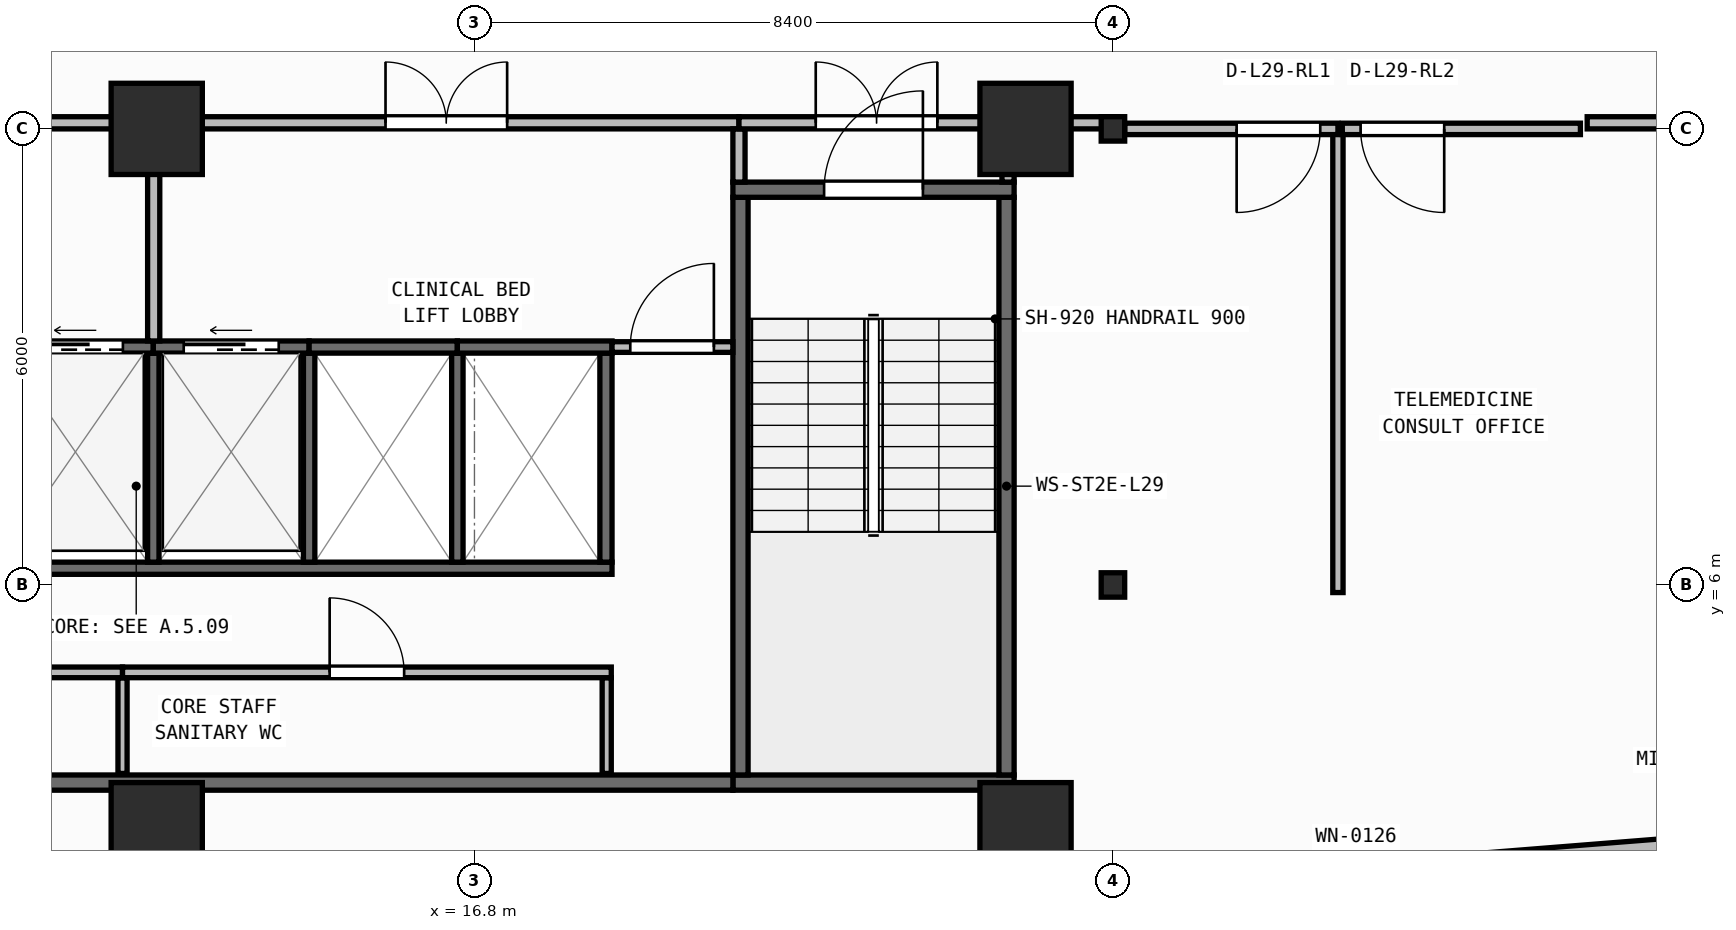
"""IFC4 building model, lengths in metres.
Left out: names, types, materials, properties, quantities, classifications, styles, units other than length and angle.
Written with IfcOpenShell. Run it as: python <this file> out.ifc"""

import sys

from ifc_helpers import new_model, si_unit, direction, frame, frame_2d, origin, origin_2d, place, context, subcontext, project, spatial, rectangle, i_section, extrude, element, fill, save


model = new_model("IFC4")
c1 = context("Model", 3, precision=1e-05, world=origin(), true_north=direction((0.0, 1.0)))
c2 = subcontext(c1, "Body", "Model", "MODEL_VIEW")
j1 = project(units=[si_unit("LENGTHUNIT", "METRE"), si_unit("PLANEANGLEUNIT", "RADIAN")], contexts=[c1])
p1 = place(None, origin())
s1 = spatial("IfcSite", under=j1, at=p1, CompositionType="ELEMENT")
p2 = place(p1, origin())
s2 = spatial("IfcBuilding", under=s1, at=p2, CompositionType="ELEMENT")
p3 = place(p2, frame((0.0, 0.0, 119.15)))
s3 = spatial("IfcBuildingStorey", under=s2, at=p3, CompositionType="ELEMENT", Elevation=119.15)
for number, where, z_axis, x_axis in (
    (1, (12.62, 2.8, 0.0), (0.0, 0.0, 1.0), (1.0, 0.0, 0.0)),
    (2, (24.05, 2.8, 0.0), (0.0, 0.0, 1.0), (1.0, 0.0, 0.0)),
):
    element("IfcColumn", number, at=place(p3, frame(where, z_axis=z_axis, x_axis=x_axis)), inside=s3, PredefinedType="COLUMN", context=c2, shape_type="SweptSolid", body=[
        extrude(rectangle(XDim=1.2, YDim=1.2, at=origin_2d()), origin(), (0.0, 0.0, 1.0), 3.95),
    ])
p4 = place(p3, frame((25.2, 6.0, 0.0), z_axis=(0.0, 0.0, 1.0), x_axis=(1.0, 0.0, 0.0)))
e3 = element("IfcColumn", 3, at=p4, inside=s3, PredefinedType="COLUMN", context=c2, shape_type="SweptSolid", body=[
    extrude(i_section(OverallWidth=0.309, OverallDepth=0.321, WebThickness=0.014, FlangeThickness=0.022, FilletRadius=0.017, at=origin_2d()), origin(), (0.0, 0.0, 1.0), 3.95),
])
for number, where, z_axis, x_axis in (
    (4, (12.62, 12.0, 0.0), (0.0, 0.0, 1.0), (1.0, 0.0, 0.0)),
    (5, (24.05, 12.0, 0.0), (0.0, 0.0, 1.0), (1.0, 0.0, 0.0)),
):
    element("IfcColumn", number, at=place(p3, frame(where, z_axis=z_axis, x_axis=x_axis)), inside=s3, PredefinedType="COLUMN", context=c2, shape_type="SweptSolid", body=[
        extrude(rectangle(XDim=1.2, YDim=1.2, at=origin_2d()), origin(), (0.0, 0.0, 1.0), 3.95),
    ])
p5 = place(p3, frame((25.2, 12.0, 0.0), z_axis=(0.0, 0.0, 1.0), x_axis=(1.0, 0.0, 0.0)))
e6 = element("IfcColumn", 6, at=p5, inside=s3, PredefinedType="COLUMN", context=c2, shape_type="SweptSolid", body=[
    extrude(i_section(OverallWidth=0.309, OverallDepth=0.321, WebThickness=0.014, FlangeThickness=0.022, FilletRadius=0.017, at=origin_2d()), origin(), (0.0, 0.0, 1.0), 3.95),
])
p6 = place(p3, frame((2.76, 0.173, 0.0), z_axis=(0.0, 0.0, 1.0), x_axis=(0.996857931723, 0.079210251617, 0.0)))
e7 = element("IfcWall", 7, at=p6, inside=s3, PredefinedType="STANDARD", context=c2, shape_type="SweptSolid", body=[
    extrude(rectangle(XDim=51.442, YDim=0.26, at=frame_2d((25.721, 0.0))), origin(), (0.0, 0.0, 1.0), 3.71),
])
p7 = place(p6, frame((24.521, 0.0, 0.9)))
e8 = element("IfcOpeningElement", 8, at=p7, cuts=e7, PredefinedType="OPENING", context=c2, shape_type="SweptSolid", body=[
    extrude(rectangle(XDim=2.4, YDim=1.65, at=frame_2d((1.2, 0.825))), frame((0.0, 0.14, 0.0), z_axis=(0.0, -1.0, 0.0), x_axis=(1.0, 0.0, 0.0)), (0.0, 0.0, 1.0), 0.28),
])
p8 = place(p3, frame((20.2, 3.4, 0.0), z_axis=(0.0, 0.0, 1.0), x_axis=(1.0, 0.0, 0.0)))
e9 = element("IfcWall", 9, at=p8, inside=s3, PredefinedType="SHEAR", context=c2, shape_type="SweptSolid", body=[
    extrude(rectangle(XDim=3.7, YDim=0.2, at=frame_2d((1.85, 0.0))), origin(), (0.0, 0.0, 1.0), 3.71),
])
for number, where, z_axis, x_axis in (
    (10, (20.3, 3.5, 0.0), (0.0, 0.0, 1.0), (0.0, 1.0, 0.0)),
    (11, (23.8, 3.5, 0.0), (0.0, 0.0, 1.0), (0.0, 1.0, 0.0)),
):
    element("IfcWall", number, at=place(p3, frame(where, z_axis=z_axis, x_axis=x_axis)), inside=s3, PredefinedType="SHEAR", context=c2, shape_type="SweptSolid", body=[
        extrude(rectangle(XDim=7.6, YDim=0.2, at=frame_2d((3.8, 0.0))), origin(), (0.0, 0.0, 1.0), 3.71),
    ])
p9 = place(p3, frame((20.2, 11.2, 0.0), z_axis=(0.0, 0.0, 1.0), x_axis=(1.0, 0.0, 0.0)))
e12 = element("IfcWall", 12, at=p9, inside=s3, PredefinedType="SHEAR", context=c2, shape_type="SweptSolid", body=[
    extrude(rectangle(XDim=3.7, YDim=0.2, at=frame_2d((1.85, 0.0))), origin(), (0.0, 0.0, 1.0), 3.71),
])
p10 = place(p9, frame((1.2, 0.0, 0.0)))
e13 = element("IfcOpeningElement", 13, at=p10, cuts=e12, PredefinedType="OPENING", context=c2, shape_type="SweptSolid", body=[
    extrude(rectangle(XDim=1.3, YDim=2.15, at=frame_2d((0.65, 1.075))), frame((0.0, 0.11, 0.0), z_axis=(0.0, -1.0, 0.0), x_axis=(1.0, 0.0, 0.0)), (0.0, 0.0, 1.0), 0.22),
])
p11 = place(p3, frame((6.5, 3.4, 0.0), z_axis=(0.0, 0.0, 1.0), x_axis=(1.0, 0.0, 0.0)))
e14 = element("IfcWall", 14, at=p11, inside=s3, PredefinedType="SHEAR", context=c2, shape_type="SweptSolid", body=[
    extrude(rectangle(XDim=13.7, YDim=0.2, at=frame_2d((6.85, 0.0))), origin(), (0.0, 0.0, 1.0), 3.71),
])
p12 = place(p3, frame((6.5, 6.22, 0.0), z_axis=(0.0, 0.0, 1.0), x_axis=(1.0, 0.0, 0.0)))
e15 = element("IfcWall", 15, at=p12, inside=s3, PredefinedType="SHEAR", context=c2, shape_type="SweptSolid", body=[
    extrude(rectangle(XDim=12.11, YDim=0.16, at=frame_2d((6.055, 0.0))), origin(), (0.0, 0.0, 1.0), 3.71),
])
p13 = place(p3, frame((18.53, 6.3, 0.0), z_axis=(0.0, 0.0, 1.0), x_axis=(0.0, 1.0, 0.0)))
e16 = element("IfcWall", 16, at=p13, inside=s3, PredefinedType="SHEAR", context=c2, shape_type="SweptSolid", body=[
    extrude(rectangle(XDim=2.75, YDim=0.16, at=frame_2d((1.375, 0.0))), origin(), (0.0, 0.0, 1.0), 3.71),
])
for number, where, z_axis, x_axis in (
    (17, (12.575, 6.3, 0.0), (0.0, 0.0, 1.0), (0.0, 1.0, 0.0)),
    (18, (14.625, 6.3, 0.0), (0.0, 0.0, 1.0), (0.0, 1.0, 0.0)),
    (19, (16.575, 6.3, 0.0), (0.0, 0.0, 1.0), (0.0, 1.0, 0.0)),
):
    element("IfcWall", number, at=place(p3, frame(where, z_axis=z_axis, x_axis=x_axis)), inside=s3, PredefinedType="SHEAR", context=c2, shape_type="SweptSolid", body=[
        extrude(rectangle(XDim=2.75, YDim=0.15, at=frame_2d((1.375, 0.0))), origin(), (0.0, 0.0, 1.0), 3.71),
    ])
p14 = place(p3, frame((10.525, 9.13, 0.0), z_axis=(0.0, 0.0, 1.0), x_axis=(1.0, 0.0, 0.0)))
e20 = element("IfcWall", 20, at=p14, inside=s3, PredefinedType="SHEAR", context=c2, shape_type="SweptSolid", body=[
    extrude(rectangle(XDim=2.05, YDim=0.16, at=frame_2d((1.025, 0.0))), origin(), (0.0, 0.0, 1.0), 3.71),
])
p15 = place(p14, frame((0.4, 0.0, 0.0)))
e21 = element("IfcOpeningElement", 21, at=p15, cuts=e20, PredefinedType="OPENING", context=c2, shape_type="SweptSolid", body=[
    extrude(rectangle(XDim=1.25, YDim=2.15, at=frame_2d((0.625, 1.075))), frame((0.0, 0.09, 0.0), z_axis=(0.0, -1.0, 0.0), x_axis=(1.0, 0.0, 0.0)), (0.0, 0.0, 1.0), 0.18),
])
p16 = place(p3, frame((12.575, 9.13, 0.0), z_axis=(0.0, 0.0, 1.0), x_axis=(1.0, 0.0, 0.0)))
e22 = element("IfcWall", 22, at=p16, inside=s3, PredefinedType="SHEAR", context=c2, shape_type="SweptSolid", body=[
    extrude(rectangle(XDim=2.05, YDim=0.16, at=frame_2d((1.025, 0.0))), origin(), (0.0, 0.0, 1.0), 3.71),
])
p17 = place(p16, frame((0.4, 0.0, 0.0)))
e23 = element("IfcOpeningElement", 23, at=p17, cuts=e22, PredefinedType="OPENING", context=c2, shape_type="SweptSolid", body=[
    extrude(rectangle(XDim=1.25, YDim=2.15, at=frame_2d((0.625, 1.075))), frame((0.0, 0.09, 0.0), z_axis=(0.0, -1.0, 0.0), x_axis=(1.0, 0.0, 0.0)), (0.0, 0.0, 1.0), 0.18),
])
p18 = place(p3, frame((14.625, 9.13, 0.0), z_axis=(0.0, 0.0, 1.0), x_axis=(1.0, 0.0, 0.0)))
e24 = element("IfcWall", 24, at=p18, inside=s3, PredefinedType="SHEAR", context=c2, shape_type="SweptSolid", body=[
    extrude(rectangle(XDim=1.95, YDim=0.16, at=frame_2d((0.975, 0.0))), origin(), (0.0, 0.0, 1.0), 3.71),
])
p19 = place(p3, frame((16.575, 9.13, 0.0), z_axis=(0.0, 0.0, 1.0), x_axis=(1.0, 0.0, 0.0)))
e25 = element("IfcWall", 25, at=p19, inside=s3, PredefinedType="SHEAR", context=c2, shape_type="SweptSolid", body=[
    extrude(rectangle(XDim=2.035, YDim=0.16, at=frame_2d((1.018, 0.0))), origin(), (0.0, 0.0, 1.0), 3.71),
])
for number, where, z_axis, x_axis in (
    (26, (12.17, 3.52, 0.0), (0.0, 0.0, 1.0), (0.0, 1.0, 0.0)),
    (27, (18.54, 3.52, 0.0), (0.0, 0.0, 1.0), (0.0, 1.0, 0.0)),
):
    element("IfcWall", number, at=place(p3, frame(where, z_axis=z_axis, x_axis=x_axis)), inside=s3, PredefinedType="PARTITIONING", context=c2, shape_type="SweptSolid", body=[
        extrude(rectangle(XDim=1.26, YDim=0.12, at=frame_2d((0.63, 0.0))), origin(), (0.0, 0.0, 1.0), 3.71),
    ])
p20 = place(p3, frame((6.5, 4.85, 0.0), z_axis=(0.0, 0.0, 1.0), x_axis=(1.0, 0.0, 0.0)))
e28 = element("IfcWall", 28, at=p20, inside=s3, PredefinedType="PARTITIONING", context=c2, shape_type="SweptSolid", body=[
    extrude(rectangle(XDim=5.67, YDim=0.14, at=frame_2d((2.835, 0.0))), origin(), (0.0, 0.0, 1.0), 3.71),
])
p21 = place(p20, frame((2.285, 0.0, 0.0)))
e29 = element("IfcOpeningElement", 29, at=p21, cuts=e28, PredefinedType="OPENING", context=c2, shape_type="SweptSolid", body=[
    extrude(rectangle(XDim=1.1, YDim=2.1, at=frame_2d((0.55, 1.05))), frame((0.0, 0.08, 0.0), z_axis=(0.0, -1.0, 0.0), x_axis=(1.0, 0.0, 0.0)), (0.0, 0.0, 1.0), 0.16),
])
p22 = place(p3, frame((12.17, 4.85, 0.0), z_axis=(0.0, 0.0, 1.0), x_axis=(1.0, 0.0, 0.0)))
e30 = element("IfcWall", 30, at=p22, inside=s3, PredefinedType="PARTITIONING", context=c2, shape_type="SweptSolid", body=[
    extrude(rectangle(XDim=6.43, YDim=0.14, at=frame_2d((3.215, 0.0))), origin(), (0.0, 0.0, 1.0), 3.71),
])
p23 = place(p22, frame((2.725, 0.0, 0.0)))
e31 = element("IfcOpeningElement", 31, at=p23, cuts=e30, PredefinedType="OPENING", context=c2, shape_type="SweptSolid", body=[
    extrude(rectangle(XDim=0.98, YDim=2.1, at=frame_2d((0.49, 1.05))), frame((0.0, 0.08, 0.0), z_axis=(0.0, -1.0, 0.0), x_axis=(1.0, 0.0, 0.0)), (0.0, 0.0, 1.0), 0.16),
])
p24 = place(p3, frame((18.61, 9.13, 0.0), z_axis=(0.0, 0.0, 1.0), x_axis=(1.0, 0.0, 0.0)))
e32 = element("IfcWall", 32, at=p24, inside=s3, PredefinedType="PARTITIONING", context=c2, shape_type="SweptSolid", body=[
    extrude(rectangle(XDim=1.59, YDim=0.14, at=frame_2d((0.795, 0.0))), origin(), (0.0, 0.0, 1.0), 3.71),
])
p25 = place(p24, frame((0.24, 0.0, 0.0)))
e33 = element("IfcOpeningElement", 33, at=p25, cuts=e32, PredefinedType="OPENING", context=c2, shape_type="SweptSolid", body=[
    extrude(rectangle(XDim=1.1, YDim=2.1, at=frame_2d((0.55, 1.05))), frame((0.0, 0.08, 0.0), z_axis=(0.0, -1.0, 0.0), x_axis=(1.0, 0.0, 0.0)), (0.0, 0.0, 1.0), 0.16),
])
p26 = place(p3, frame((6.4, 12.08, 0.0), z_axis=(0.0, 0.0, 1.0), x_axis=(1.0, 0.0, 0.0)))
e34 = element("IfcWall", 34, at=p26, inside=s3, PredefinedType="PARTITIONING", context=c2, shape_type="SweptSolid", body=[
    extrude(rectangle(XDim=6.18, YDim=0.16, at=frame_2d((3.09, 0.0))), origin(), (0.0, 0.0, 1.0), 3.083),
])
p27 = place(p26, frame((2.29, 0.0, 0.0)))
e35 = element("IfcOpeningElement", 35, at=p27, cuts=e34, PredefinedType="OPENING", context=c2, shape_type="SweptSolid", body=[
    extrude(rectangle(XDim=1.6, YDim=2.05, at=frame_2d((0.8, 1.025))), frame((0.0, 0.09, 0.0), z_axis=(0.0, -1.0, 0.0), x_axis=(1.0, 0.0, 0.0)), (0.0, 0.0, 1.0), 0.18),
])
p28 = place(p3, frame((12.58, 9.21, 0.0), z_axis=(0.0, 0.0, 1.0), x_axis=(0.0, 1.0, 0.0)))
e36 = element("IfcWall", 36, at=p28, inside=s3, PredefinedType="PARTITIONING", context=c2, shape_type="SweptSolid", body=[
    extrude(rectangle(XDim=2.79, YDim=0.16, at=frame_2d((1.395, 0.0))), origin(), (0.0, 0.0, 1.0), 3.71),
])
p29 = place(p3, frame((12.58, 12.08, 0.0), z_axis=(0.0, 0.0, 1.0), x_axis=(1.0, 0.0, 0.0)))
e37 = element("IfcWall", 37, at=p29, inside=s3, PredefinedType="PARTITIONING", context=c2, shape_type="SweptSolid", body=[
    extrude(rectangle(XDim=7.7, YDim=0.16, at=frame_2d((3.85, 0.0))), origin(), (0.0, 0.0, 1.0), 3.083),
])
p30 = place(p29, frame((3.05, 0.0, 0.0)))
e38 = element("IfcOpeningElement", 38, at=p30, cuts=e37, PredefinedType="OPENING", context=c2, shape_type="SweptSolid", body=[
    extrude(rectangle(XDim=1.6, YDim=2.05, at=frame_2d((0.8, 1.025))), frame((0.0, 0.09, 0.0), z_axis=(0.0, -1.0, 0.0), x_axis=(1.0, 0.0, 0.0)), (0.0, 0.0, 1.0), 0.18),
])
p31 = place(p3, frame((20.28, 11.3, 0.0), z_axis=(0.0, 0.0, 1.0), x_axis=(0.0, 1.0, 0.0)))
e39 = element("IfcWall", 39, at=p31, inside=s3, PredefinedType="PARTITIONING", context=c2, shape_type="SweptSolid", body=[
    extrude(rectangle(XDim=0.7, YDim=0.16, at=frame_2d((0.35, 0.0))), origin(), (0.0, 0.0, 1.0), 3.71),
])
p32 = place(p3, frame((20.28, 12.08, 0.0), z_axis=(0.0, 0.0, 1.0), x_axis=(1.0, 0.0, 0.0)))
e40 = element("IfcWall", 40, at=p32, inside=s3, PredefinedType="PARTITIONING", context=c2, shape_type="SweptSolid", body=[
    extrude(rectangle(XDim=3.62, YDim=0.16, at=frame_2d((1.81, 0.0))), origin(), (0.0, 0.0, 1.0), 3.083),
])
p33 = place(p32, frame((1.01, 0.0, 0.0)))
e41 = element("IfcOpeningElement", 41, at=p33, cuts=e40, PredefinedType="OPENING", context=c2, shape_type="SweptSolid", body=[
    extrude(rectangle(XDim=1.6, YDim=2.05, at=frame_2d((0.8, 1.025))), frame((0.0, 0.09, 0.0), z_axis=(0.0, -1.0, 0.0), x_axis=(1.0, 0.0, 0.0)), (0.0, 0.0, 1.0), 0.18),
])
p34 = place(p3, frame((23.82, 11.3, 0.0), z_axis=(0.0, 0.0, 1.0), x_axis=(0.0, 1.0, 0.0)))
e42 = element("IfcWall", 42, at=p34, inside=s3, PredefinedType="PARTITIONING", context=c2, shape_type="SweptSolid", body=[
    extrude(rectangle(XDim=0.7, YDim=0.16, at=frame_2d((0.35, 0.0))), origin(), (0.0, 0.0, 1.0), 3.71),
])
p35 = place(p3, frame((28.16, 5.9, 0.0), z_axis=(0.0, 0.0, 1.0), x_axis=(0.0, 1.0, 0.0)))
e43 = element("IfcWall", 43, at=p35, inside=s3, PredefinedType="PARTITIONING", context=c2, shape_type="SweptSolid", body=[
    extrude(rectangle(XDim=6.1, YDim=0.135, at=frame_2d((3.05, 0.0))), origin(), (0.0, 0.0, 1.0), 3.71),
])
p36 = place(p3, frame((28.16, 12.0, 0.0), z_axis=(0.0, 0.0, 1.0), x_axis=(-1.0, 0.0, 0.0)))
e44 = element("IfcWall", 44, at=p36, inside=s3, PredefinedType="PARTITIONING", context=c2, shape_type="SweptSolid", body=[
    extrude(rectangle(XDim=2.805, YDim=0.15, at=frame_2d((1.403, 0.0))), origin(), (0.0, 0.0, 1.0), 3.083),
])
p37 = place(p36, frame((0.233, 0.0, 0.0)))
e45 = element("IfcOpeningElement", 45, at=p37, cuts=e44, PredefinedType="OPENING", context=c2, shape_type="SweptSolid", body=[
    extrude(rectangle(XDim=1.1, YDim=2.1, at=frame_2d((0.55, 1.05))), frame((0.0, 0.085, 0.0), z_axis=(0.0, -1.0, 0.0), x_axis=(1.0, 0.0, 0.0)), (0.0, 0.0, 1.0), 0.17),
])
p38 = place(p3, frame((31.35, 12.0, 0.0), z_axis=(0.0, 0.0, 1.0), x_axis=(-1.0, 0.0, 0.0)))
e46 = element("IfcWall", 46, at=p38, inside=s3, PredefinedType="PARTITIONING", context=c2, shape_type="SweptSolid", body=[
    extrude(rectangle(XDim=3.133, YDim=0.15, at=frame_2d((1.566, 0.0))), origin(), (0.0, 0.0, 1.0), 3.083),
])
p39 = place(p38, frame((1.792, 0.0, 0.0)))
e47 = element("IfcOpeningElement", 47, at=p39, cuts=e46, PredefinedType="OPENING", context=c2, shape_type="SweptSolid", body=[
    extrude(rectangle(XDim=1.1, YDim=2.1, at=frame_2d((0.55, 1.05))), frame((0.0, 0.085, 0.0), z_axis=(0.0, -1.0, 0.0), x_axis=(1.0, 0.0, 0.0)), (0.0, 0.0, 1.0), 0.17),
])
p40 = place(p3, frame((24.02, 12.08, 0.0), z_axis=(0.0, 0.0, 1.0), x_axis=(1.0, 0.0, 0.0)))
e48 = element("IfcWall", 48, at=p40, inside=s3, PredefinedType="PARTITIONING", context=c2, shape_type="SweptSolid", body=[
    extrude(rectangle(XDim=1.245, YDim=0.16, at=frame_2d((0.623, 0.0))), origin(), (0.0, 0.0, 1.0), 3.083),
])
p41 = place(p3, frame((31.439, 12.08, 0.0), z_axis=(0.0, 0.0, 1.0), x_axis=(1.0, 0.0, 0.0)))
e49 = element("IfcWall", 49, at=p41, inside=s3, PredefinedType="PARTITIONING", context=c2, shape_type="SweptSolid", body=[
    extrude(rectangle(XDim=2.631, YDim=0.16, at=frame_2d((1.315, 0.0))), origin(), (0.0, 0.0, 1.0), 3.083),
])
p42 = place(p10, origin())
e50 = element("IfcDoor", 50, at=p42, inside=s3, OperationType="SINGLE_SWING_RIGHT", PredefinedType="DOOR", context=c2, shape_type="SweptSolid", body=[
    extrude(rectangle(XDim=1.3, YDim=2.15, at=frame_2d((0.65, 1.075))), frame((0.0, 0.025, 0.0), z_axis=(0.0, -1.0, 0.0), x_axis=(1.0, 0.0, 0.0)), (0.0, 0.0, 1.0), 0.05),
])
fill(e13, e50)
p43 = place(p15, origin())
e51 = element("IfcDoor", 51, at=p43, inside=s3, OperationType="SLIDING_TO_LEFT", PredefinedType="DOOR", context=c2, shape_type="SweptSolid", body=[
    extrude(rectangle(XDim=1.25, YDim=2.15, at=frame_2d((0.625, 1.075))), frame((0.0, 0.025, 0.0), z_axis=(0.0, -1.0, 0.0), x_axis=(1.0, 0.0, 0.0)), (0.0, 0.0, 1.0), 0.05),
])
fill(e21, e51)
p44 = place(p17, origin())
e52 = element("IfcDoor", 52, at=p44, inside=s3, OperationType="SLIDING_TO_LEFT", PredefinedType="DOOR", context=c2, shape_type="SweptSolid", body=[
    extrude(rectangle(XDim=1.25, YDim=2.15, at=frame_2d((0.625, 1.075))), frame((0.0, 0.025, 0.0), z_axis=(0.0, -1.0, 0.0), x_axis=(1.0, 0.0, 0.0)), (0.0, 0.0, 1.0), 0.05),
])
fill(e23, e52)
p45 = place(p23, origin())
e53 = element("IfcDoor", 53, at=p45, inside=s3, OperationType="SINGLE_SWING_LEFT", PredefinedType="DOOR", context=c2, shape_type="SweptSolid", body=[
    extrude(rectangle(XDim=0.98, YDim=2.1, at=frame_2d((0.49, 1.05))), frame((0.0, 0.025, 0.0), z_axis=(0.0, -1.0, 0.0), x_axis=(1.0, 0.0, 0.0)), (0.0, 0.0, 1.0), 0.05),
])
fill(e31, e53)
p46 = place(p25, origin())
e54 = element("IfcDoor", 54, at=p46, inside=s3, OperationType="SINGLE_SWING_RIGHT", PredefinedType="DOOR", context=c2, shape_type="SweptSolid", body=[
    extrude(rectangle(XDim=1.1, YDim=2.1, at=frame_2d((0.55, 1.05))), frame((0.0, 0.025, 0.0), z_axis=(0.0, -1.0, 0.0), x_axis=(1.0, 0.0, 0.0)), (0.0, 0.0, 1.0), 0.05),
])
fill(e33, e54)
p47 = place(p30, origin())
e55 = element("IfcDoor", 55, at=p47, inside=s3, OperationType="DOUBLE_DOOR_SINGLE_SWING", PredefinedType="DOOR", context=c2, shape_type="SweptSolid", body=[
    extrude(rectangle(XDim=1.6, YDim=2.05, at=frame_2d((0.8, 1.025))), frame((0.0, 0.025, 0.0), z_axis=(0.0, -1.0, 0.0), x_axis=(1.0, 0.0, 0.0)), (0.0, 0.0, 1.0), 0.05),
])
fill(e38, e55)
p48 = place(p33, origin())
e56 = element("IfcDoor", 56, at=p48, inside=s3, OperationType="DOUBLE_DOOR_SINGLE_SWING", PredefinedType="DOOR", context=c2, shape_type="SweptSolid", body=[
    extrude(rectangle(XDim=1.6, YDim=2.05, at=frame_2d((0.8, 1.025))), frame((0.0, 0.025, 0.0), z_axis=(0.0, -1.0, 0.0), x_axis=(1.0, 0.0, 0.0)), (0.0, 0.0, 1.0), 0.05),
])
fill(e41, e56)
p49 = place(p37, origin())
e57 = element("IfcDoor", 57, at=p49, inside=s3, OperationType="SINGLE_SWING_RIGHT", PredefinedType="DOOR", context=c2, shape_type="SweptSolid", body=[
    extrude(rectangle(XDim=1.1, YDim=2.1, at=frame_2d((0.55, 1.05))), frame((0.0, 0.025, 0.0), z_axis=(0.0, -1.0, 0.0), x_axis=(1.0, 0.0, 0.0)), (0.0, 0.0, 1.0), 0.05),
])
fill(e45, e57)
p50 = place(p39, origin())
e58 = element("IfcDoor", 58, at=p50, inside=s3, OperationType="SINGLE_SWING_LEFT", PredefinedType="DOOR", context=c2, shape_type="SweptSolid", body=[
    extrude(rectangle(XDim=1.1, YDim=2.1, at=frame_2d((0.55, 1.05))), frame((0.0, 0.025, 0.0), z_axis=(0.0, -1.0, 0.0), x_axis=(1.0, 0.0, 0.0)), (0.0, 0.0, 1.0), 0.05),
])
fill(e47, e58)
save(model, sys.argv[1])
